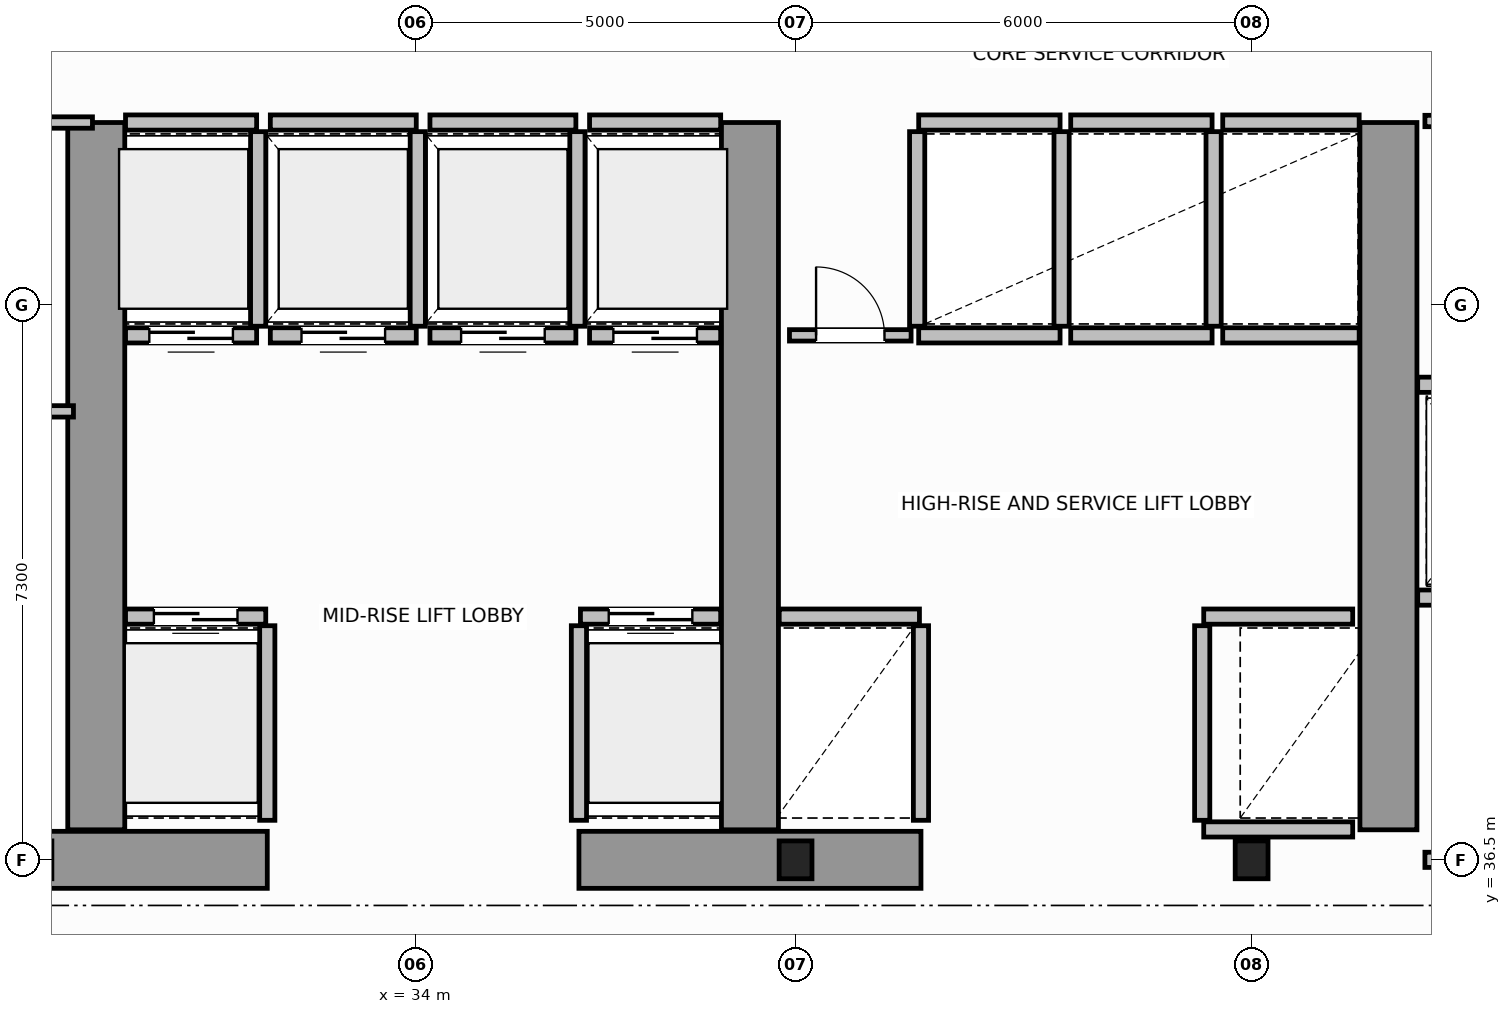
"""IFC4 building model, lengths in metres.
Left out: names, types, materials, properties, quantities, classifications, styles, units other than length and angle.
Written with IfcOpenShell. Run it as: python <this file> out.ifc"""

import sys

from ifc_helpers import new_model, si_unit, direction, frame, frame_2d, origin, origin_2d, place, context, subcontext, project, spatial, rectangle, i_section, extrude, source, transform, mapped, element, fill, save


model = new_model("IFC4")
c1 = context("Model", 3, precision=1e-05, world=origin(), true_north=direction((0.0, 1.0)))
c2 = subcontext(c1, "Body", "Model", "MODEL_VIEW")
j1 = project(units=[si_unit("LENGTHUNIT", "METRE"), si_unit("PLANEANGLEUNIT", "RADIAN")], contexts=[c1])
p1 = place(None, origin())
s1 = spatial("IfcSite", under=j1, at=p1, CompositionType="ELEMENT")
p2 = place(p1, origin())
s2 = spatial("IfcBuilding", under=s1, at=p2, CompositionType="ELEMENT")
p3 = place(p2, frame((0.0, 0.0, 157.6)))
s3 = spatial("IfcBuildingStorey", under=s2, at=p3, CompositionType="ELEMENT", Elevation=157.6)
m1 = source(origin(), c2, "Body", "SweptSolid", [
    extrude(i_section(OverallWidth=0.432, OverallDepth=0.498, WebThickness=0.055, FlangeThickness=0.068, FilletRadius=0.015, at=origin_2d()), origin(), (0.0, 0.0, 1.0), 3.8),
])
for number, where, z_axis, x_axis in (
    (1, (39.0, 36.5, 0.0), (0.0, 0.0, 1.0), (1.0, 0.0, 0.0)),
    (2, (45.0, 36.5, 0.0), (0.0, 0.0, 1.0), (1.0, 0.0, 0.0)),
):
    element("IfcColumn", number, at=place(p3, frame(where, z_axis=z_axis, x_axis=x_axis)), inside=s3, PredefinedType="COLUMN", context=c2, shape_type="MappedRepresentation", body=[
        mapped(m1, transform((0.0, 0.0, 0.0), scale=1.0)),
    ])
for number, where, z_axis, x_axis in (
    (3, (27.55, 36.5, 0.0), (0.0, 0.0, 1.0), (1.0, 0.0, 0.0)),
    (4, (36.15, 36.5, 0.0), (0.0, 0.0, 1.0), (1.0, 0.0, 0.0)),
):
    element("IfcWall", number, at=place(p3, frame(where, z_axis=z_axis, x_axis=x_axis)), inside=s3, PredefinedType="SHEAR", context=c2, shape_type="SweptSolid", body=[
        extrude(rectangle(XDim=4.5, YDim=0.75, at=frame_2d((2.25, 0.0))), origin(), (0.0, 0.0, 1.0), 3.8),
    ])
for number, where, z_axis, x_axis in (
    (5, (29.8, 36.895, 0.0), (0.0, 0.0, 1.0), (0.0, 1.0, 0.0)),
    (6, (38.4, 36.895, 0.0), (0.0, 0.0, 1.0), (0.0, 1.0, 0.0)),
    (7, (46.8, 36.895, 0.0), (0.0, 0.0, 1.0), (0.0, 1.0, 0.0)),
):
    element("IfcWall", number, at=place(p3, frame(where, z_axis=z_axis, x_axis=x_axis)), inside=s3, PredefinedType="SHEAR", context=c2, shape_type="SweptSolid", body=[
        extrude(rectangle(XDim=9.305, YDim=0.75, at=frame_2d((4.652, 0.0))), origin(), (0.0, 0.0, 1.0), 3.8),
    ])
p4 = place(p3, frame((47.28, 36.5, 0.0), z_axis=(0.0, 0.0, 1.0), x_axis=(1.0, 0.0, 0.0)))
e8 = element("IfcWall", 8, at=p4, inside=s3, PredefinedType="SOLIDWALL", context=c2, shape_type="SweptSolid", body=[
    extrude(rectangle(XDim=2.47, YDim=0.2, at=frame_2d((1.235, 0.0))), origin(), (0.0, 0.0, 1.0), 2.37),
])
p5 = place(p4, frame((0.65, 0.0, 0.0)))
e9 = element("IfcOpeningElement", 9, at=p5, cuts=e8, PredefinedType="OPENING", context=c2, shape_type="SweptSolid", body=[
    extrude(rectangle(XDim=1.1, YDim=2.15, at=frame_2d((0.55, 1.075))), frame((0.0, 0.11, 0.0), z_axis=(0.0, -1.0, 0.0), x_axis=(1.0, 0.0, 0.0)), (0.0, 0.0, 1.0), 0.22),
])
p6 = place(p3, frame((30.185, 39.7, 0.0), z_axis=(0.0, 0.0, 1.0), x_axis=(1.0, 0.0, 0.0)))
e10 = element("IfcWall", 10, at=p6, inside=s3, PredefinedType="SOLIDWALL", context=c2, shape_type="SweptSolid", body=[
    extrude(rectangle(XDim=1.845, YDim=0.2, at=frame_2d((0.922, 0.0))), origin(), (0.0, 0.0, 1.0), 3.58),
])
p7 = place(p6, frame((0.373, 0.0, 0.0)))
e11 = element("IfcOpeningElement", 11, at=p7, cuts=e10, PredefinedType="OPENING", context=c2, shape_type="SweptSolid", body=[
    extrude(rectangle(XDim=1.1, YDim=2.15, at=frame_2d((0.55, 1.075))), frame((0.0, 0.11, 0.0), z_axis=(0.0, -1.0, 0.0), x_axis=(1.0, 0.0, 0.0)), (0.0, 0.0, 1.0), 0.22),
])
p8 = place(p3, frame((32.05, 37.02, 0.0), z_axis=(0.0, 0.0, 1.0), x_axis=(0.0, 1.0, 0.0)))
e12 = element("IfcWall", 12, at=p8, inside=s3, PredefinedType="SOLIDWALL", context=c2, shape_type="SweptSolid", body=[
    extrude(rectangle(XDim=2.56, YDim=0.2, at=frame_2d((1.28, 0.0))), origin(), (0.0, 0.0, 1.0), 3.58),
])
p9 = place(p3, frame((36.17, 39.7, 0.0), z_axis=(0.0, 0.0, 1.0), x_axis=(1.0, 0.0, 0.0)))
e13 = element("IfcWall", 13, at=p9, inside=s3, PredefinedType="SOLIDWALL", context=c2, shape_type="SweptSolid", body=[
    extrude(rectangle(XDim=1.845, YDim=0.2, at=frame_2d((0.922, 0.0))), origin(), (0.0, 0.0, 1.0), 3.58),
])
p10 = place(p9, frame((0.372, 0.0, 0.0)))
e14 = element("IfcOpeningElement", 14, at=p10, cuts=e13, PredefinedType="OPENING", context=c2, shape_type="SweptSolid", body=[
    extrude(rectangle(XDim=1.1, YDim=2.15, at=frame_2d((0.55, 1.075))), frame((0.0, 0.11, 0.0), z_axis=(0.0, -1.0, 0.0), x_axis=(1.0, 0.0, 0.0)), (0.0, 0.0, 1.0), 0.22),
])
p11 = place(p3, frame((36.15, 37.02, 0.0), z_axis=(0.0, 0.0, 1.0), x_axis=(0.0, 1.0, 0.0)))
e15 = element("IfcWall", 15, at=p11, inside=s3, PredefinedType="SOLIDWALL", context=c2, shape_type="SweptSolid", body=[
    extrude(rectangle(XDim=2.56, YDim=0.2, at=frame_2d((1.28, 0.0))), origin(), (0.0, 0.0, 1.0), 3.58),
])
p12 = place(p3, frame((30.185, 43.4, 0.0), z_axis=(0.0, 0.0, 1.0), x_axis=(1.0, 0.0, 0.0)))
e16 = element("IfcWall", 16, at=p12, inside=s3, PredefinedType="SOLIDWALL", context=c2, shape_type="SweptSolid", body=[
    extrude(rectangle(XDim=1.725, YDim=0.2, at=frame_2d((0.862, 0.0))), origin(), (0.0, 0.0, 1.0), 3.58),
])
p13 = place(p12, frame((0.313, 0.0, 0.0)))
e17 = element("IfcOpeningElement", 17, at=p13, cuts=e16, PredefinedType="OPENING", context=c2, shape_type="SweptSolid", body=[
    extrude(rectangle(XDim=1.1, YDim=2.15, at=frame_2d((0.55, 1.075))), frame((0.0, 0.11, 0.0), z_axis=(0.0, -1.0, 0.0), x_axis=(1.0, 0.0, 0.0)), (0.0, 0.0, 1.0), 0.22),
])
p14 = place(p3, frame((30.185, 46.2, 0.0), z_axis=(0.0, 0.0, 1.0), x_axis=(1.0, 0.0, 0.0)))
e18 = element("IfcWall", 18, at=p14, inside=s3, PredefinedType="SOLIDWALL", context=c2, shape_type="SweptSolid", body=[
    extrude(rectangle(XDim=1.725, YDim=0.2, at=frame_2d((0.862, 0.0))), origin(), (0.0, 0.0, 1.0), 3.58),
])
p15 = place(p3, frame((31.93, 43.52, 0.0), z_axis=(0.0, 0.0, 1.0), x_axis=(0.0, 1.0, 0.0)))
e19 = element("IfcWall", 19, at=p15, inside=s3, PredefinedType="SOLIDWALL", context=c2, shape_type="SweptSolid", body=[
    extrude(rectangle(XDim=2.56, YDim=0.2, at=frame_2d((1.28, 0.0))), origin(), (0.0, 0.0, 1.0), 3.58),
])
p16 = place(p3, frame((32.09, 43.4, 0.0), z_axis=(0.0, 0.0, 1.0), x_axis=(1.0, 0.0, 0.0)))
e20 = element("IfcWall", 20, at=p16, inside=s3, PredefinedType="SOLIDWALL", context=c2, shape_type="SweptSolid", body=[
    extrude(rectangle(XDim=1.92, YDim=0.2, at=frame_2d((0.96, 0.0))), origin(), (0.0, 0.0, 1.0), 3.58),
])
p17 = place(p16, frame((0.41, 0.0, 0.0)))
e21 = element("IfcOpeningElement", 21, at=p17, cuts=e20, PredefinedType="OPENING", context=c2, shape_type="SweptSolid", body=[
    extrude(rectangle(XDim=1.1, YDim=2.15, at=frame_2d((0.55, 1.075))), frame((0.0, 0.11, 0.0), z_axis=(0.0, -1.0, 0.0), x_axis=(1.0, 0.0, 0.0)), (0.0, 0.0, 1.0), 0.22),
])
p18 = place(p3, frame((32.09, 46.2, 0.0), z_axis=(0.0, 0.0, 1.0), x_axis=(1.0, 0.0, 0.0)))
e22 = element("IfcWall", 22, at=p18, inside=s3, PredefinedType="SOLIDWALL", context=c2, shape_type="SweptSolid", body=[
    extrude(rectangle(XDim=1.92, YDim=0.2, at=frame_2d((0.96, 0.0))), origin(), (0.0, 0.0, 1.0), 3.58),
])
p19 = place(p3, frame((34.03, 43.52, 0.0), z_axis=(0.0, 0.0, 1.0), x_axis=(0.0, 1.0, 0.0)))
e23 = element("IfcWall", 23, at=p19, inside=s3, PredefinedType="SOLIDWALL", context=c2, shape_type="SweptSolid", body=[
    extrude(rectangle(XDim=2.56, YDim=0.2, at=frame_2d((1.28, 0.0))), origin(), (0.0, 0.0, 1.0), 3.58),
])
p20 = place(p3, frame((34.19, 43.4, 0.0), z_axis=(0.0, 0.0, 1.0), x_axis=(1.0, 0.0, 0.0)))
e24 = element("IfcWall", 24, at=p20, inside=s3, PredefinedType="SOLIDWALL", context=c2, shape_type="SweptSolid", body=[
    extrude(rectangle(XDim=1.92, YDim=0.2, at=frame_2d((0.96, 0.0))), origin(), (0.0, 0.0, 1.0), 3.58),
])
p21 = place(p20, frame((0.41, 0.0, 0.0)))
e25 = element("IfcOpeningElement", 25, at=p21, cuts=e24, PredefinedType="OPENING", context=c2, shape_type="SweptSolid", body=[
    extrude(rectangle(XDim=1.1, YDim=2.15, at=frame_2d((0.55, 1.075))), frame((0.0, 0.11, 0.0), z_axis=(0.0, -1.0, 0.0), x_axis=(1.0, 0.0, 0.0)), (0.0, 0.0, 1.0), 0.22),
])
p22 = place(p3, frame((34.19, 46.2, 0.0), z_axis=(0.0, 0.0, 1.0), x_axis=(1.0, 0.0, 0.0)))
e26 = element("IfcWall", 26, at=p22, inside=s3, PredefinedType="SOLIDWALL", context=c2, shape_type="SweptSolid", body=[
    extrude(rectangle(XDim=1.92, YDim=0.2, at=frame_2d((0.96, 0.0))), origin(), (0.0, 0.0, 1.0), 3.58),
])
p23 = place(p3, frame((36.13, 43.52, 0.0), z_axis=(0.0, 0.0, 1.0), x_axis=(0.0, 1.0, 0.0)))
e27 = element("IfcWall", 27, at=p23, inside=s3, PredefinedType="SOLIDWALL", context=c2, shape_type="SweptSolid", body=[
    extrude(rectangle(XDim=2.56, YDim=0.2, at=frame_2d((1.28, 0.0))), origin(), (0.0, 0.0, 1.0), 3.58),
])
p24 = place(p3, frame((36.29, 43.4, 0.0), z_axis=(0.0, 0.0, 1.0), x_axis=(1.0, 0.0, 0.0)))
e28 = element("IfcWall", 28, at=p24, inside=s3, PredefinedType="SOLIDWALL", context=c2, shape_type="SweptSolid", body=[
    extrude(rectangle(XDim=1.725, YDim=0.2, at=frame_2d((0.862, 0.0))), origin(), (0.0, 0.0, 1.0), 3.58),
])
p25 = place(p24, frame((0.313, 0.0, 0.0)))
e29 = element("IfcOpeningElement", 29, at=p25, cuts=e28, PredefinedType="OPENING", context=c2, shape_type="SweptSolid", body=[
    extrude(rectangle(XDim=1.1, YDim=2.15, at=frame_2d((0.55, 1.075))), frame((0.0, 0.11, 0.0), z_axis=(0.0, -1.0, 0.0), x_axis=(1.0, 0.0, 0.0)), (0.0, 0.0, 1.0), 0.22),
])
p26 = place(p3, frame((36.29, 46.2, 0.0), z_axis=(0.0, 0.0, 1.0), x_axis=(1.0, 0.0, 0.0)))
e30 = element("IfcWall", 30, at=p26, inside=s3, PredefinedType="SOLIDWALL", context=c2, shape_type="SweptSolid", body=[
    extrude(rectangle(XDim=1.725, YDim=0.2, at=frame_2d((0.862, 0.0))), origin(), (0.0, 0.0, 1.0), 3.58),
])
p27 = place(p3, frame((38.785, 39.7, 0.0), z_axis=(0.0, 0.0, 1.0), x_axis=(1.0, 0.0, 0.0)))
e31 = element("IfcWall", 31, at=p27, inside=s3, PredefinedType="SOLIDWALL", context=c2, shape_type="SweptSolid", body=[
    extrude(rectangle(XDim=1.845, YDim=0.2, at=frame_2d((0.922, 0.0))), origin(), (0.0, 0.0, 1.0), 3.58),
])
p28 = place(p3, frame((40.65, 37.02, 0.0), z_axis=(0.0, 0.0, 1.0), x_axis=(0.0, 1.0, 0.0)))
e32 = element("IfcWall", 32, at=p28, inside=s3, PredefinedType="SOLIDWALL", context=c2, shape_type="SweptSolid", body=[
    extrude(rectangle(XDim=2.56, YDim=0.2, at=frame_2d((1.28, 0.0))), origin(), (0.0, 0.0, 1.0), 3.58),
])
p29 = place(p3, frame((44.37, 39.7, 0.0), z_axis=(0.0, 0.0, 1.0), x_axis=(1.0, 0.0, 0.0)))
e33 = element("IfcWall", 33, at=p29, inside=s3, PredefinedType="SOLIDWALL", context=c2, shape_type="SweptSolid", body=[
    extrude(rectangle(XDim=1.96, YDim=0.2, at=frame_2d((0.98, 0.0))), origin(), (0.0, 0.0, 1.0), 3.58),
])
p30 = place(p3, frame((44.37, 36.9, 0.0), z_axis=(0.0, 0.0, 1.0), x_axis=(1.0, 0.0, 0.0)))
e34 = element("IfcWall", 34, at=p30, inside=s3, PredefinedType="SOLIDWALL", context=c2, shape_type="SweptSolid", body=[
    extrude(rectangle(XDim=1.96, YDim=0.2, at=frame_2d((0.98, 0.0))), origin(), (0.0, 0.0, 1.0), 2.37),
])
p31 = place(p3, frame((44.35, 37.02, 0.0), z_axis=(0.0, 0.0, 1.0), x_axis=(0.0, 1.0, 0.0)))
e35 = element("IfcWall", 35, at=p31, inside=s3, PredefinedType="SOLIDWALL", context=c2, shape_type="SweptSolid", body=[
    extrude(rectangle(XDim=2.56, YDim=0.2, at=frame_2d((1.28, 0.0))), origin(), (0.0, 0.0, 1.0), 3.58),
])
for number, where, z_axis, x_axis in (
    (36, (40.62, 43.4, 0.0), (0.0, 0.0, 1.0), (1.0, 0.0, 0.0)),
    (37, (40.62, 46.2, 0.0), (0.0, 0.0, 1.0), (1.0, 0.0, 0.0)),
):
    element("IfcWall", number, at=place(p3, frame(where, z_axis=z_axis, x_axis=x_axis)), inside=s3, PredefinedType="SOLIDWALL", context=c2, shape_type="SweptSolid", body=[
        extrude(rectangle(XDim=1.86, YDim=0.2, at=frame_2d((0.93, 0.0))), origin(), (0.0, 0.0, 1.0), 3.58),
    ])
for number, where, z_axis, x_axis in (
    (38, (40.6, 43.52, 0.0), (0.0, 0.0, 1.0), (0.0, 1.0, 0.0)),
    (39, (42.5, 43.52, 0.0), (0.0, 0.0, 1.0), (0.0, 1.0, 0.0)),
):
    element("IfcWall", number, at=place(p3, frame(where, z_axis=z_axis, x_axis=x_axis)), inside=s3, PredefinedType="SOLIDWALL", context=c2, shape_type="SweptSolid", body=[
        extrude(rectangle(XDim=2.56, YDim=0.2, at=frame_2d((1.28, 0.0))), origin(), (0.0, 0.0, 1.0), 3.58),
    ])
for number, where, z_axis, x_axis in (
    (40, (42.62, 43.4, 0.0), (0.0, 0.0, 1.0), (1.0, 0.0, 0.0)),
    (41, (42.62, 46.2, 0.0), (0.0, 0.0, 1.0), (1.0, 0.0, 0.0)),
):
    element("IfcWall", number, at=place(p3, frame(where, z_axis=z_axis, x_axis=x_axis)), inside=s3, PredefinedType="SOLIDWALL", context=c2, shape_type="SweptSolid", body=[
        extrude(rectangle(XDim=1.86, YDim=0.2, at=frame_2d((0.93, 0.0))), origin(), (0.0, 0.0, 1.0), 3.58),
    ])
p32 = place(p3, frame((44.5, 43.52, 0.0), z_axis=(0.0, 0.0, 1.0), x_axis=(0.0, 1.0, 0.0)))
e42 = element("IfcWall", 42, at=p32, inside=s3, PredefinedType="SOLIDWALL", context=c2, shape_type="SweptSolid", body=[
    extrude(rectangle(XDim=2.56, YDim=0.2, at=frame_2d((1.28, 0.0))), origin(), (0.0, 0.0, 1.0), 3.58),
])
for number, where, z_axis, x_axis in (
    (43, (44.62, 43.4, 0.0), (0.0, 0.0, 1.0), (1.0, 0.0, 0.0)),
    (44, (44.62, 46.2, 0.0), (0.0, 0.0, 1.0), (1.0, 0.0, 0.0)),
):
    element("IfcWall", number, at=place(p3, frame(where, z_axis=z_axis, x_axis=x_axis)), inside=s3, PredefinedType="SOLIDWALL", context=c2, shape_type="SweptSolid", body=[
        extrude(rectangle(XDim=1.795, YDim=0.2, at=frame_2d((0.897, 0.0))), origin(), (0.0, 0.0, 1.0), 3.58),
    ])
p33 = place(p3, frame((47.185, 39.95, 0.0), z_axis=(0.0, 0.0, 1.0), x_axis=(1.0, 0.0, 0.0)))
e45 = element("IfcWall", 45, at=p33, inside=s3, PredefinedType="SOLIDWALL", context=c2, shape_type="SweptSolid", body=[
    extrude(rectangle(XDim=2.145, YDim=0.2, at=frame_2d((1.073, 0.0))), origin(), (0.0, 0.0, 1.0), 3.58),
])
p34 = place(p33, frame((0.522, 0.0, 0.0)))
e46 = element("IfcOpeningElement", 46, at=p34, cuts=e45, PredefinedType="OPENING", context=c2, shape_type="SweptSolid", body=[
    extrude(rectangle(XDim=1.1, YDim=2.15, at=frame_2d((0.55, 1.075))), frame((0.0, 0.11, 0.0), z_axis=(0.0, -1.0, 0.0), x_axis=(1.0, 0.0, 0.0)), (0.0, 0.0, 1.0), 0.22),
])
p35 = place(p3, frame((47.185, 42.75, 0.0), z_axis=(0.0, 0.0, 1.0), x_axis=(1.0, 0.0, 0.0)))
e47 = element("IfcWall", 47, at=p35, inside=s3, PredefinedType="SOLIDWALL", context=c2, shape_type="SweptSolid", body=[
    extrude(rectangle(XDim=2.145, YDim=0.2, at=frame_2d((1.073, 0.0))), origin(), (0.0, 0.0, 1.0), 3.58),
])
p36 = place(p3, frame((21.25, 46.2, 0.0), z_axis=(0.0, 0.0, 1.0), x_axis=(1.0, 0.0, 0.0)))
e48 = element("IfcWall", 48, at=p36, inside=s3, PredefinedType="PARTITIONING", context=c2, shape_type="SweptSolid", body=[
    extrude(rectangle(XDim=8.5, YDim=0.15, at=frame_2d((4.25, 0.0))), origin(), (0.0, 0.0, 1.0), 3.58),
])
p37 = place(p3, frame((21.5, 42.4, 0.0), z_axis=(0.0, 0.0, 1.0), x_axis=(1.0, 0.0, 0.0)))
e49 = element("IfcWall", 49, at=p37, inside=s3, PredefinedType="PARTITIONING", context=c2, shape_type="SweptSolid", body=[
    extrude(rectangle(XDim=8.0, YDim=0.15, at=frame_2d((4.0, 0.0))), origin(), (0.0, 0.0, 1.0), 3.58),
])
p38 = place(p37, frame((3.4, 0.0, 0.0)))
e50 = element("IfcOpeningElement", 50, at=p38, cuts=e49, PredefinedType="OPENING", context=c2, shape_type="SweptSolid", body=[
    extrude(rectangle(XDim=0.9, YDim=2.1, at=frame_2d((0.45, 1.05))), frame((0.0, 0.085, 0.0), z_axis=(0.0, -1.0, 0.0), x_axis=(1.0, 0.0, 0.0)), (0.0, 0.0, 1.0), 0.17),
])
p39 = place(p3, frame((47.28, 46.22, 0.0), z_axis=(0.0, 0.0, 1.0), x_axis=(1.0, 0.0, 0.0)))
e51 = element("IfcWall", 51, at=p39, inside=s3, PredefinedType="PARTITIONING", context=c2, shape_type="SweptSolid", body=[
    extrude(rectangle(XDim=2.1, YDim=0.15, at=frame_2d((1.05, 0.0))), origin(), (0.0, 0.0, 1.0), 3.58),
])
p40 = place(p39, frame((0.55, 0.0, 0.0)))
e52 = element("IfcOpeningElement", 52, at=p40, cuts=e51, PredefinedType="OPENING", context=c2, shape_type="SweptSolid", body=[
    extrude(rectangle(XDim=0.9, YDim=2.1, at=frame_2d((0.45, 1.05))), frame((0.0, 0.085, 0.0), z_axis=(0.0, -1.0, 0.0), x_axis=(1.0, 0.0, 0.0)), (0.0, 0.0, 1.0), 0.17),
])
p41 = place(p3, frame((38.92, 43.4, 0.0), z_axis=(0.0, 0.0, 1.0), x_axis=(1.0, 0.0, 0.0)))
e53 = element("IfcWall", 53, at=p41, inside=s3, PredefinedType="PARTITIONING", context=c2, shape_type="SweptSolid", body=[
    extrude(rectangle(XDim=1.6, YDim=0.15, at=frame_2d((0.8, 0.0))), origin(), (0.0, 0.0, 1.0), 3.58),
])
p42 = place(p41, frame((0.35, 0.0, 0.0)))
e54 = element("IfcOpeningElement", 54, at=p42, cuts=e53, PredefinedType="OPENING", context=c2, shape_type="SweptSolid", body=[
    extrude(rectangle(XDim=0.9, YDim=2.1, at=frame_2d((0.45, 1.05))), frame((0.0, 0.085, 0.0), z_axis=(0.0, -1.0, 0.0), x_axis=(1.0, 0.0, 0.0)), (0.0, 0.0, 1.0), 0.17),
])
m2 = source(origin(), c2, "Body", "SweptSolid", [
    extrude(rectangle(XDim=1.1, YDim=2.15, at=frame_2d((0.55, 1.075))), frame((0.0, 0.025, 0.0), z_axis=(0.0, -1.0, 0.0), x_axis=(1.0, 0.0, 0.0)), (0.0, 0.0, 1.0), 0.05),
])
p43 = place(p7, origin())
e55 = element("IfcDoor", 55, at=p43, inside=s3, OperationType="DOUBLE_DOOR_SLIDING", PredefinedType="DOOR", context=c2, shape_type="MappedRepresentation", body=[
    mapped(m2, transform((0.0, 0.0, 0.0), scale=1.0)),
])
fill(e11, e55)
p44 = place(p10, origin())
e56 = element("IfcDoor", 56, at=p44, inside=s3, OperationType="DOUBLE_DOOR_SLIDING", PredefinedType="DOOR", context=c2, shape_type="MappedRepresentation", body=[
    mapped(m2, transform((0.0, 0.0, 0.0), scale=1.0)),
])
fill(e14, e56)
p45 = place(p13, origin())
e57 = element("IfcDoor", 57, at=p45, inside=s3, OperationType="DOUBLE_DOOR_SLIDING", PredefinedType="DOOR", context=c2, shape_type="MappedRepresentation", body=[
    mapped(m2, transform((0.0, 0.0, 0.0), scale=1.0)),
])
fill(e17, e57)
p46 = place(p17, origin())
e58 = element("IfcDoor", 58, at=p46, inside=s3, OperationType="DOUBLE_DOOR_SLIDING", PredefinedType="DOOR", context=c2, shape_type="MappedRepresentation", body=[
    mapped(m2, transform((0.0, 0.0, 0.0), scale=1.0)),
])
fill(e21, e58)
p47 = place(p21, origin())
e59 = element("IfcDoor", 59, at=p47, inside=s3, OperationType="DOUBLE_DOOR_SLIDING", PredefinedType="DOOR", context=c2, shape_type="MappedRepresentation", body=[
    mapped(m2, transform((0.0, 0.0, 0.0), scale=1.0)),
])
fill(e25, e59)
p48 = place(p25, origin())
e60 = element("IfcDoor", 60, at=p48, inside=s3, OperationType="DOUBLE_DOOR_SLIDING", PredefinedType="DOOR", context=c2, shape_type="MappedRepresentation", body=[
    mapped(m2, transform((0.0, 0.0, 0.0), scale=1.0)),
])
fill(e29, e60)
m3 = source(origin(), c2, "Body", "SweptSolid", [
    extrude(rectangle(XDim=0.9, YDim=2.1, at=frame_2d((0.45, 1.05))), frame((0.0, 0.025, 0.0), z_axis=(0.0, -1.0, 0.0), x_axis=(1.0, 0.0, 0.0)), (0.0, 0.0, 1.0), 0.05),
])
p49 = place(p42, origin())
e61 = element("IfcDoor", 61, at=p49, inside=s3, OperationType="SINGLE_SWING_LEFT", PredefinedType="DOOR", context=c2, shape_type="MappedRepresentation", body=[
    mapped(m3, transform((0.0, 0.0, 0.0), scale=1.0)),
])
fill(e54, e61)
save(model, sys.argv[1])
